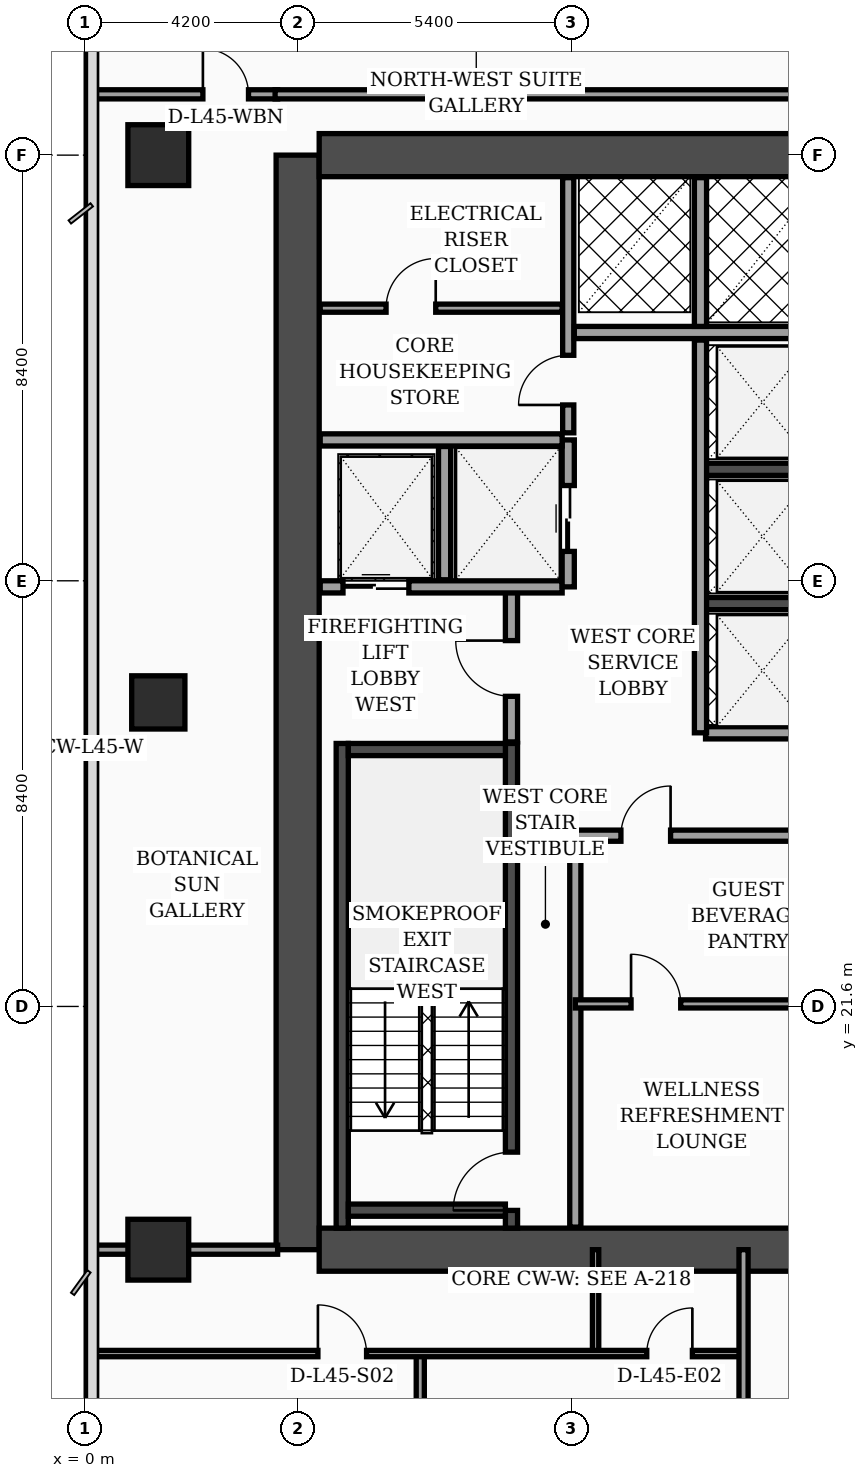
"""IFC4 building model, lengths in metres.
Left out: names, types, materials, properties, quantities, classifications, styles, units other than length and angle.
Written with IfcOpenShell. Run it as: python <this file> out.ifc"""

import sys

from ifc_helpers import new_model, si_unit, direction, frame, frame_2d, origin, origin_2d, place, context, subcontext, project, spatial, rectangle, extrude, element, fill, save


model = new_model("IFC4")
c1 = context("Model", 3, precision=1e-05, world=origin(), true_north=direction((0.0, 1.0)))
c2 = subcontext(c1, "Body", "Model", "MODEL_VIEW")
j1 = project(units=[si_unit("LENGTHUNIT", "METRE"), si_unit("PLANEANGLEUNIT", "RADIAN")], contexts=[c1])
p1 = place(None, origin())
s1 = spatial("IfcSite", under=j1, at=p1, CompositionType="ELEMENT")
p2 = place(p1, origin())
s2 = spatial("IfcBuilding", under=s1, at=p2, CompositionType="ELEMENT")
p3 = place(p2, frame((0.0, 0.0, 182.7)))
s3 = spatial("IfcBuildingStorey", under=s2, at=p3, CompositionType="ELEMENT", Elevation=182.7)
p4 = place(p3, frame((4.2, 16.8, 0.0), z_axis=(0.0, 0.0, 1.0), x_axis=(0.0, 1.0, 0.0)))
e1 = element("IfcWall", 1, at=p4, inside=s3, PredefinedType="SHEAR", context=c2, shape_type="SweptSolid", body=[
    extrude(rectangle(XDim=21.6, YDim=0.85, at=frame_2d((10.8, 0.0))), origin(), (0.0, 0.0, 1.0), 3.52),
])
for number, where, z_axis, x_axis in (
    (2, (4.625, 38.4, 0.0), (0.0, 0.0, 1.0), (1.0, 0.0, 0.0)),
    (3, (4.625, 16.8, 0.0), (0.0, 0.0, 1.0), (1.0, 0.0, 0.0)),
):
    element("IfcWall", number, at=place(p3, frame(where, z_axis=z_axis, x_axis=x_axis)), inside=s3, PredefinedType="SHEAR", context=c2, shape_type="SweptSolid", body=[
        extrude(rectangle(XDim=9.95, YDim=0.85, at=frame_2d((4.975, 0.0))), origin(), (0.0, 0.0, 1.0), 3.52),
    ])
p5 = place(p3, frame((5.08, 17.225, 0.0), z_axis=(0.0, 0.0, 1.0), x_axis=(0.0, 1.0, 0.0)))
e4 = element("IfcWall", 4, at=p5, inside=s3, PredefinedType="SOLIDWALL", context=c2, shape_type="SweptSolid", body=[
    extrude(rectangle(XDim=9.565, YDim=0.24, at=frame_2d((4.782, 0.0))), origin(), (0.0, 0.0, 1.0), 3.52),
])
p6 = place(p3, frame((8.42, 17.225, 0.0), z_axis=(0.0, 0.0, 1.0), x_axis=(0.0, 1.0, 0.0)))
e5 = element("IfcWall", 5, at=p6, inside=s3, PredefinedType="SOLIDWALL", context=c2, shape_type="SweptSolid", body=[
    extrude(rectangle(XDim=9.565, YDim=0.24, at=frame_2d((4.782, 0.0))), origin(), (0.0, 0.0, 1.0), 3.52),
])
p7 = place(p6, frame((0.35, 0.0, 0.0)))
e6 = element("IfcOpeningElement", 6, at=p7, cuts=e5, PredefinedType="OPENING", context=c2, shape_type="SweptSolid", body=[
    extrude(rectangle(XDim=1.15, YDim=2.2, at=frame_2d((0.575, 1.1))), frame((0.0, 0.13, 0.0), z_axis=(0.0, -1.0, 0.0), x_axis=(1.0, 0.0, 0.0)), (0.0, 0.0, 1.0), 0.26),
])
for number, where, z_axis, x_axis in (
    (7, (5.2, 17.58, 0.0), (0.0, 0.0, 1.0), (1.0, 0.0, 0.0)),
    (8, (5.2, 26.67, 0.0), (0.0, 0.0, 1.0), (1.0, 0.0, 0.0)),
):
    element("IfcWall", number, at=place(p3, frame(where, z_axis=z_axis, x_axis=x_axis)), inside=s3, PredefinedType="SOLIDWALL", context=c2, shape_type="SweptSolid", body=[
        extrude(rectangle(XDim=3.1, YDim=0.24, at=frame_2d((1.55, 0.0))), origin(), (0.0, 0.0, 1.0), 3.52),
    ])
for number, where, z_axis, x_axis in (
    (9, (12.18, 29.55, 0.0), (0.0, 0.0, 1.0), (1.0, 0.0, 0.0)),
    (10, (12.18, 32.2, 0.0), (0.0, 0.0, 1.0), (1.0, 0.0, 0.0)),
):
    element("IfcWall", number, at=place(p3, frame(where, z_axis=z_axis, x_axis=x_axis)), inside=s3, PredefinedType="SOLIDWALL", context=c2, shape_type="SweptSolid", body=[
        extrude(rectangle(XDim=2.395, YDim=0.24, at=frame_2d((1.198, 0.0))), origin(), (0.0, 0.0, 1.0), 3.52),
    ])
p8 = place(p3, frame((1.45, 16.8, 0.0), z_axis=(0.0, 0.0, 1.0), x_axis=(1.0, 0.0, 0.0)))
e11 = element("IfcColumn", 11, at=p8, inside=s3, PredefinedType="COLUMN", context=c2, shape_type="SweptSolid", body=[
    extrude(rectangle(XDim=1.2, YDim=1.2, at=origin_2d()), origin(), (0.0, 0.0, 1.0), 3.52),
])
p9 = place(p3, frame((1.45, 27.6, 0.0), z_axis=(0.0, 0.0, 1.0), x_axis=(1.0, 0.0, 0.0)))
e12 = element("IfcColumn", 12, at=p9, inside=s3, PredefinedType="COLUMN", context=c2, shape_type="SweptSolid", body=[
    extrude(rectangle(XDim=1.05, YDim=1.05, at=origin_2d()), origin(), (0.0, 0.0, 1.0), 3.52),
])
p10 = place(p3, frame((1.45, 38.4, 0.0), z_axis=(0.0, 0.0, 1.0), x_axis=(1.0, 0.0, 0.0)))
e13 = element("IfcColumn", 13, at=p10, inside=s3, PredefinedType="COLUMN", context=c2, shape_type="SweptSolid", body=[
    extrude(rectangle(XDim=1.2, YDim=1.2, at=origin_2d()), origin(), (0.0, 0.0, 1.0), 3.52),
])
p11 = place(p3, frame((8.42, 26.82, 0.0), z_axis=(0.0, 0.0, 1.0), x_axis=(0.0, 1.0, 0.0)))
e14 = element("IfcWall", 14, at=p11, inside=s3, PredefinedType="SOLIDWALL", context=c2, shape_type="SweptSolid", body=[
    extrude(rectangle(XDim=3.0, YDim=0.24, at=frame_2d((1.5, 0.0))), origin(), (0.0, 0.0, 1.0), 3.52),
])
p12 = place(p11, frame((0.9, 0.0, 0.0)))
e15 = element("IfcOpeningElement", 15, at=p12, cuts=e14, PredefinedType="OPENING", context=c2, shape_type="SweptSolid", body=[
    extrude(rectangle(XDim=1.1, YDim=2.2, at=frame_2d((0.55, 1.1))), frame((0.0, 0.13, 0.0), z_axis=(0.0, -1.0, 0.0), x_axis=(1.0, 0.0, 0.0)), (0.0, 0.0, 1.0), 0.26),
])
p13 = place(p3, frame((4.645, 29.88, 0.0), z_axis=(0.0, 0.0, 1.0), x_axis=(1.0, 0.0, 0.0)))
e16 = element("IfcWall", 16, at=p13, inside=s3, PredefinedType="SOLIDWALL", context=c2, shape_type="SweptSolid", body=[
    extrude(rectangle(XDim=4.775, YDim=0.24, at=frame_2d((2.387, 0.0))), origin(), (0.0, 0.0, 1.0), 3.52),
])
p14 = place(p13, frame((0.45, 0.0, 0.0)))
e17 = element("IfcOpeningElement", 17, at=p14, cuts=e16, PredefinedType="OPENING", context=c2, shape_type="SweptSolid", body=[
    extrude(rectangle(XDim=1.3, YDim=2.35, at=frame_2d((0.65, 1.175))), frame((0.0, 0.13, 0.0), z_axis=(0.0, -1.0, 0.0), x_axis=(1.0, 0.0, 0.0)), (0.0, 0.0, 1.0), 0.26),
])
p15 = place(p3, frame((7.1, 30.02, 0.0), z_axis=(0.0, 0.0, 1.0), x_axis=(0.0, 1.0, 0.0)))
e18 = element("IfcWall", 18, at=p15, inside=s3, PredefinedType="SOLIDWALL", context=c2, shape_type="SweptSolid", body=[
    extrude(rectangle(XDim=2.63, YDim=0.24, at=frame_2d((1.315, 0.0))), origin(), (0.0, 0.0, 1.0), 3.52),
])
p16 = place(p3, frame((9.54, 29.88, 0.0), z_axis=(0.0, 0.0, 1.0), x_axis=(0.0, 1.0, 0.0)))
e19 = element("IfcWall", 19, at=p16, inside=s3, PredefinedType="SOLIDWALL", context=c2, shape_type="SweptSolid", body=[
    extrude(rectangle(XDim=2.9, YDim=0.24, at=frame_2d((1.45, 0.0))), origin(), (0.0, 0.0, 1.0), 3.52),
])
p17 = place(p16, frame((0.7, 0.0, 0.0)))
e20 = element("IfcOpeningElement", 20, at=p17, cuts=e19, PredefinedType="OPENING", context=c2, shape_type="SweptSolid", body=[
    extrude(rectangle(XDim=1.3, YDim=2.35, at=frame_2d((0.65, 1.175))), frame((0.0, 0.13, 0.0), z_axis=(0.0, -1.0, 0.0), x_axis=(1.0, 0.0, 0.0)), (0.0, 0.0, 1.0), 0.26),
])
p18 = place(p3, frame((4.645, 32.78, 0.0), z_axis=(0.0, 0.0, 1.0), x_axis=(1.0, 0.0, 0.0)))
e21 = element("IfcWall", 21, at=p18, inside=s3, PredefinedType="SOLIDWALL", context=c2, shape_type="SweptSolid", body=[
    extrude(rectangle(XDim=4.775, YDim=0.24, at=frame_2d((2.387, 0.0))), origin(), (0.0, 0.0, 1.0), 3.17),
])
p19 = place(p3, frame((9.68, 17.245, 0.0), z_axis=(0.0, 0.0, 1.0), x_axis=(0.0, 1.0, 0.0)))
e22 = element("IfcWall", 22, at=p19, inside=s3, PredefinedType="SOLIDWALL", context=c2, shape_type="SweptSolid", body=[
    extrude(rectangle(XDim=7.755, YDim=0.22, at=frame_2d((3.877, 0.0))), origin(), (0.0, 0.0, 1.0), 3.52),
])
p20 = place(p3, frame((4.645, 35.38, 0.0), z_axis=(0.0, 0.0, 1.0), x_axis=(1.0, 0.0, 0.0)))
e23 = element("IfcWall", 23, at=p20, inside=s3, PredefinedType="PARTITIONING", context=c2, shape_type="SweptSolid", body=[
    extrude(rectangle(XDim=4.775, YDim=0.16, at=frame_2d((2.387, 0.0))), origin(), (0.0, 0.0, 1.0), 3.52),
])
p21 = place(p20, frame((1.3, 0.0, 0.0)))
e24 = element("IfcOpeningElement", 24, at=p21, cuts=e23, PredefinedType="OPENING", context=c2, shape_type="SweptSolid", body=[
    extrude(rectangle(XDim=0.98, YDim=2.15, at=frame_2d((0.49, 1.075))), frame((0.0, 0.09, 0.0), z_axis=(0.0, -1.0, 0.0), x_axis=(1.0, 0.0, 0.0)), (0.0, 0.0, 1.0), 0.18),
])
p22 = place(p3, frame((9.54, 32.92, 0.0), z_axis=(0.0, 0.0, 1.0), x_axis=(0.0, 1.0, 0.0)))
e25 = element("IfcWall", 25, at=p22, inside=s3, PredefinedType="SOLIDWALL", context=c2, shape_type="SweptSolid", body=[
    extrude(rectangle(XDim=5.035, YDim=0.22, at=frame_2d((2.518, 0.0))), origin(), (0.0, 0.0, 1.0), 3.52),
])
p23 = place(p22, frame((0.55, 0.0, 0.0)))
e26 = element("IfcOpeningElement", 26, at=p23, cuts=e25, PredefinedType="OPENING", context=c2, shape_type="SweptSolid", body=[
    extrude(rectangle(XDim=0.98, YDim=2.15, at=frame_2d((0.49, 1.075))), frame((0.0, 0.12, 0.0), z_axis=(0.0, -1.0, 0.0), x_axis=(1.0, 0.0, 0.0)), (0.0, 0.0, 1.0), 0.24),
])
p24 = place(p3, frame((9.68, 21.65, 0.0), z_axis=(0.0, 0.0, 1.0), x_axis=(1.0, 0.0, 0.0)))
e27 = element("IfcWall", 27, at=p24, inside=s3, PredefinedType="PARTITIONING", context=c2, shape_type="SweptSolid", body=[
    extrude(rectangle(XDim=4.875, YDim=0.16, at=frame_2d((2.438, 0.0))), origin(), (0.0, 0.0, 1.0), 3.52),
])
p25 = place(p24, frame((1.1, 0.0, 0.0)))
e28 = element("IfcOpeningElement", 28, at=p25, cuts=e27, PredefinedType="OPENING", context=c2, shape_type="SweptSolid", body=[
    extrude(rectangle(XDim=0.98, YDim=2.15, at=frame_2d((0.49, 1.075))), frame((0.0, 0.09, 0.0), z_axis=(0.0, -1.0, 0.0), x_axis=(1.0, 0.0, 0.0)), (0.0, 0.0, 1.0), 0.18),
])
p26 = place(p3, frame((9.68, 24.97, 0.0), z_axis=(0.0, 0.0, 1.0), x_axis=(1.0, 0.0, 0.0)))
e29 = element("IfcWall", 29, at=p26, inside=s3, PredefinedType="SOLIDWALL", context=c2, shape_type="SweptSolid", body=[
    extrude(rectangle(XDim=4.875, YDim=0.22, at=frame_2d((2.438, 0.0))), origin(), (0.0, 0.0, 1.0), 2.92),
])
p27 = place(p26, frame((0.9, 0.0, 0.0)))
e30 = element("IfcOpeningElement", 30, at=p27, cuts=e29, PredefinedType="OPENING", context=c2, shape_type="SweptSolid", body=[
    extrude(rectangle(XDim=0.98, YDim=2.15, at=frame_2d((0.49, 1.075))), frame((0.0, 0.12, 0.0), z_axis=(0.0, -1.0, 0.0), x_axis=(1.0, 0.0, 0.0)), (0.0, 0.0, 1.0), 0.24),
])
p28 = place(p3, frame((12.25, 27.0, 0.0), z_axis=(0.0, 0.0, 1.0), x_axis=(1.0, 0.0, 0.0)))
e31 = element("IfcWall", 31, at=p28, inside=s3, PredefinedType="SOLIDWALL", context=c2, shape_type="SweptSolid", body=[
    extrude(rectangle(XDim=2.305, YDim=0.24, at=frame_2d((1.152, 0.0))), origin(), (0.0, 0.0, 1.0), 3.52),
])
p29 = place(p3, frame((12.15, 27.0, 0.0), z_axis=(0.0, 0.0, 1.0), x_axis=(0.0, 1.0, 0.0)))
e32 = element("IfcWall", 32, at=p29, inside=s3, PredefinedType="SOLIDWALL", context=c2, shape_type="SweptSolid", body=[
    extrude(rectangle(XDim=7.75, YDim=0.24, at=frame_2d((3.875, 0.0))), origin(), (0.0, 0.0, 1.0), 3.52),
])
p30 = place(p3, frame((9.66, 34.9, 0.0), z_axis=(0.0, 0.0, 1.0), x_axis=(1.0, 0.0, 0.0)))
e33 = element("IfcWall", 33, at=p30, inside=s3, PredefinedType="SOLIDWALL", context=c2, shape_type="SweptSolid", body=[
    extrude(rectangle(XDim=4.895, YDim=0.24, at=frame_2d((2.448, 0.0))), origin(), (0.0, 0.0, 1.0), 3.52),
])
p31 = place(p3, frame((12.15, 35.02, 0.0), z_axis=(0.0, 0.0, 1.0), x_axis=(0.0, 1.0, 0.0)))
e34 = element("IfcWall", 34, at=p31, inside=s3, PredefinedType="SOLIDWALL", context=c2, shape_type="SweptSolid", body=[
    extrude(rectangle(XDim=2.935, YDim=0.24, at=frame_2d((1.468, 0.0))), origin(), (0.0, 0.0, 1.0), 3.52),
])
p32 = place(p3, frame((0.08, 16.8, 0.0), z_axis=(0.0, 0.0, 1.0), x_axis=(1.0, 0.0, 0.0)))
e35 = element("IfcWall", 35, at=p32, inside=s3, PredefinedType="PARTITIONING", context=c2, shape_type="SweptSolid", body=[
    extrude(rectangle(XDim=3.725, YDim=0.18, at=frame_2d((1.862, 0.0))), origin(), (0.0, 0.0, 1.0), 2.92),
])
p33 = place(p3, frame((0.08, 39.6, 0.0), z_axis=(0.0, 0.0, 1.0), x_axis=(1.0, 0.0, 0.0)))
e36 = element("IfcWall", 36, at=p33, inside=s3, PredefinedType="PARTITIONING", context=c2, shape_type="SweptSolid", body=[
    extrude(rectangle(XDim=3.725, YDim=0.18, at=frame_2d((1.862, 0.0))), origin(), (0.0, 0.0, 1.0), 2.92),
])
p34 = place(p33, frame((2.25, 0.0, 0.0)))
e37 = element("IfcOpeningElement", 37, at=p34, cuts=e36, PredefinedType="OPENING", context=c2, shape_type="SweptSolid", body=[
    extrude(rectangle(XDim=0.9, YDim=2.15, at=frame_2d((0.45, 1.075))), frame((0.0, 0.1, 0.0), z_axis=(0.0, -1.0, 0.0), x_axis=(1.0, 0.0, 0.0)), (0.0, 0.0, 1.0), 0.2),
])
p35 = place(p3, frame((10.08, 14.75, 0.0), z_axis=(0.0, 0.0, 1.0), x_axis=(0.0, 1.0, 0.0)))
e38 = element("IfcWall", 38, at=p35, inside=s3, PredefinedType="PARTITIONING", context=c2, shape_type="SweptSolid", body=[
    extrude(rectangle(XDim=2.05, YDim=0.125, at=frame_2d((1.025, 0.0))), origin(), (0.0, 0.0, 1.0), 3.52),
])
p36 = place(p3, frame((6.62, 9.85, 0.0), z_axis=(0.0, 0.0, 1.0), x_axis=(0.0, 1.0, 0.0)))
e39 = element("IfcWall", 39, at=p36, inside=s3, PredefinedType="PARTITIONING", context=c2, shape_type="SweptSolid", body=[
    extrude(rectangle(XDim=4.9, YDim=0.16, at=frame_2d((2.45, 0.0))), origin(), (0.0, 0.0, 1.0), 3.12),
])
p37 = place(p36, frame((1.97, 0.0, 0.0)))
e40 = element("IfcOpeningElement", 40, at=p37, cuts=e39, PredefinedType="OPENING", context=c2, shape_type="SweptSolid", body=[
    extrude(rectangle(XDim=0.96, YDim=2.2, at=frame_2d((0.48, 1.1))), frame((0.0, 0.09, 0.0), z_axis=(0.0, -1.0, 0.0), x_axis=(1.0, 0.0, 0.0)), (0.0, 0.0, 1.0), 0.18),
])
p38 = place(p3, frame((0.08, 14.75, 0.0), z_axis=(0.0, 0.0, 1.0), x_axis=(1.0, 0.0, 0.0)))
e41 = element("IfcWall", 41, at=p38, inside=s3, PredefinedType="PARTITIONING", context=c2, shape_type="SweptSolid", body=[
    extrude(rectangle(XDim=12.92, YDim=0.125, at=frame_2d((6.46, 0.0))), origin(), (0.0, 0.0, 1.0), 2.92),
])
p39 = place(p38, frame((4.52, 0.0, 0.0)))
e42 = element("IfcOpeningElement", 42, at=p39, cuts=e41, PredefinedType="OPENING", context=c2, shape_type="SweptSolid", body=[
    extrude(rectangle(XDim=0.96, YDim=2.2, at=frame_2d((0.48, 1.1))), frame((0.0, 0.073, 0.0), z_axis=(0.0, -1.0, 0.0), x_axis=(1.0, 0.0, 0.0)), (0.0, 0.0, 1.0), 0.145),
])
p40 = place(p38, frame((11.01, 0.0, 0.0)))
e43 = element("IfcOpeningElement", 43, at=p40, cuts=e41, PredefinedType="OPENING", context=c2, shape_type="SweptSolid", body=[
    extrude(rectangle(XDim=0.9, YDim=2.15, at=frame_2d((0.45, 1.075))), frame((0.0, 0.073, 0.0), z_axis=(0.0, -1.0, 0.0), x_axis=(1.0, 0.0, 0.0)), (0.0, 0.0, 1.0), 0.145),
])
p41 = place(p3, frame((13.0, 2.44, 0.0), z_axis=(0.0, 0.0, 1.0), x_axis=(0.0, 1.0, 0.0)))
e44 = element("IfcWall", 44, at=p41, inside=s3, PredefinedType="PARTITIONING", context=c2, shape_type="SweptSolid", body=[
    extrude(rectangle(XDim=14.36, YDim=0.18, at=frame_2d((7.18, 0.0))), origin(), (0.0, 0.0, 1.0), 2.92),
])
p42 = place(p41, frame((3.01, 0.0, 0.0)))
e45 = element("IfcOpeningElement", 45, at=p42, cuts=e44, PredefinedType="OPENING", context=c2, shape_type="SweptSolid", body=[
    extrude(rectangle(XDim=1.02, YDim=2.2, at=frame_2d((0.51, 1.1))), frame((0.0, 0.1, 0.0), z_axis=(0.0, -1.0, 0.0), x_axis=(1.0, 0.0, 0.0)), (0.0, 0.0, 1.0), 0.2),
])
p43 = place(p41, frame((9.35, 0.0, 0.0)))
e46 = element("IfcOpeningElement", 46, at=p43, cuts=e44, PredefinedType="OPENING", context=c2, shape_type="SweptSolid", body=[
    extrude(rectangle(XDim=1.02, YDim=2.2, at=frame_2d((0.51, 1.1))), frame((0.0, 0.1, 0.0), z_axis=(0.0, -1.0, 0.0), x_axis=(1.0, 0.0, 0.0)), (0.0, 0.0, 1.0), 0.2),
])
p44 = place(p3, frame((3.755, 39.6, 0.0), z_axis=(0.0, 0.0, 1.0), x_axis=(1.0, 0.0, 0.0)))
e47 = element("IfcWall", 47, at=p44, inside=s3, PredefinedType="PARTITIONING", context=c2, shape_type="SweptSolid", body=[
    extrude(rectangle(XDim=11.395, YDim=0.18, at=frame_2d((5.698, 0.0))), origin(), (0.0, 0.0, 1.0), 2.92),
])
p45 = place(p12, origin())
e48 = element("IfcDoor", 48, at=p45, inside=s3, OperationType="SINGLE_SWING_RIGHT", PredefinedType="DOOR", context=c2, shape_type="SweptSolid", body=[
    extrude(rectangle(XDim=1.1, YDim=2.2, at=frame_2d((0.55, 1.1))), frame((0.0, 0.025, 0.0), z_axis=(0.0, -1.0, 0.0), x_axis=(1.0, 0.0, 0.0)), (0.0, 0.0, 1.0), 0.05),
])
fill(e15, e48)
p46 = place(p14, origin())
e49 = element("IfcDoor", 49, at=p46, inside=s3, OperationType="DOUBLE_DOOR_SLIDING", PredefinedType="DOOR", context=c2, shape_type="SweptSolid", body=[
    extrude(rectangle(XDim=1.3, YDim=2.35, at=frame_2d((0.65, 1.175))), frame((0.0, 0.025, 0.0), z_axis=(0.0, -1.0, 0.0), x_axis=(1.0, 0.0, 0.0)), (0.0, 0.0, 1.0), 0.05),
])
fill(e17, e49)
p47 = place(p17, origin())
e50 = element("IfcDoor", 50, at=p47, inside=s3, OperationType="DOUBLE_DOOR_SLIDING", PredefinedType="DOOR", context=c2, shape_type="SweptSolid", body=[
    extrude(rectangle(XDim=1.3, YDim=2.35, at=frame_2d((0.65, 1.175))), frame((0.0, 0.025, 0.0), z_axis=(0.0, -1.0, 0.0), x_axis=(1.0, 0.0, 0.0)), (0.0, 0.0, 1.0), 0.05),
])
fill(e20, e50)
p48 = place(p21, origin())
e51 = element("IfcDoor", 51, at=p48, inside=s3, OperationType="SINGLE_SWING_RIGHT", PredefinedType="DOOR", context=c2, shape_type="SweptSolid", body=[
    extrude(rectangle(XDim=0.98, YDim=2.15, at=frame_2d((0.49, 1.075))), frame((0.0, 0.025, 0.0), z_axis=(0.0, -1.0, 0.0), x_axis=(1.0, 0.0, 0.0)), (0.0, 0.0, 1.0), 0.05),
])
fill(e24, e51)
p49 = place(p23, origin())
e52 = element("IfcDoor", 52, at=p49, inside=s3, OperationType="SINGLE_SWING_LEFT", PredefinedType="DOOR", context=c2, shape_type="SweptSolid", body=[
    extrude(rectangle(XDim=0.98, YDim=2.15, at=frame_2d((0.49, 1.075))), frame((0.0, 0.025, 0.0), z_axis=(0.0, -1.0, 0.0), x_axis=(1.0, 0.0, 0.0)), (0.0, 0.0, 1.0), 0.05),
])
fill(e26, e52)
p50 = place(p25, origin())
e53 = element("IfcDoor", 53, at=p50, inside=s3, OperationType="SINGLE_SWING_LEFT", PredefinedType="DOOR", context=c2, shape_type="SweptSolid", body=[
    extrude(rectangle(XDim=0.98, YDim=2.15, at=frame_2d((0.49, 1.075))), frame((0.0, 0.025, 0.0), z_axis=(0.0, -1.0, 0.0), x_axis=(1.0, 0.0, 0.0)), (0.0, 0.0, 1.0), 0.05),
])
fill(e28, e53)
p51 = place(p27, origin())
e54 = element("IfcDoor", 54, at=p51, inside=s3, OperationType="SINGLE_SWING_RIGHT", PredefinedType="DOOR", context=c2, shape_type="SweptSolid", body=[
    extrude(rectangle(XDim=0.98, YDim=2.15, at=frame_2d((0.49, 1.075))), frame((0.0, 0.025, 0.0), z_axis=(0.0, -1.0, 0.0), x_axis=(1.0, 0.0, 0.0)), (0.0, 0.0, 1.0), 0.05),
])
fill(e30, e54)
p52 = place(p34, origin())
e55 = element("IfcDoor", 55, at=p52, inside=s3, OperationType="SINGLE_SWING_LEFT", PredefinedType="DOOR", context=c2, shape_type="SweptSolid", body=[
    extrude(rectangle(XDim=0.9, YDim=2.15, at=frame_2d((0.45, 1.075))), frame((0.0, 0.025, 0.0), z_axis=(0.0, -1.0, 0.0), x_axis=(1.0, 0.0, 0.0)), (0.0, 0.0, 1.0), 0.05),
])
fill(e37, e55)
p53 = place(p39, origin())
e56 = element("IfcDoor", 56, at=p53, inside=s3, OperationType="SINGLE_SWING_LEFT", PredefinedType="DOOR", context=c2, shape_type="SweptSolid", body=[
    extrude(rectangle(XDim=0.96, YDim=2.2, at=frame_2d((0.48, 1.1))), frame((0.0, 0.025, 0.0), z_axis=(0.0, -1.0, 0.0), x_axis=(1.0, 0.0, 0.0)), (0.0, 0.0, 1.0), 0.05),
])
fill(e42, e56)
p54 = place(p40, origin())
e57 = element("IfcDoor", 57, at=p54, inside=s3, OperationType="SINGLE_SWING_RIGHT", PredefinedType="DOOR", context=c2, shape_type="SweptSolid", body=[
    extrude(rectangle(XDim=0.9, YDim=2.15, at=frame_2d((0.45, 1.075))), frame((0.0, 0.025, 0.0), z_axis=(0.0, -1.0, 0.0), x_axis=(1.0, 0.0, 0.0)), (0.0, 0.0, 1.0), 0.05),
])
fill(e43, e57)
p55 = place(p7, origin())
e58 = element("IfcDoor", 58, at=p55, inside=s3, OperationType="SINGLE_SWING_LEFT", PredefinedType="DOOR", context=c2, shape_type="SweptSolid", body=[
    extrude(rectangle(XDim=1.15, YDim=2.2, at=frame_2d((0.575, 1.1))), frame((0.0, 0.025, 0.0), z_axis=(0.0, -1.0, 0.0), x_axis=(1.0, 0.0, 0.0)), (0.0, 0.0, 1.0), 0.05),
])
fill(e6, e58)
save(model, sys.argv[1])
